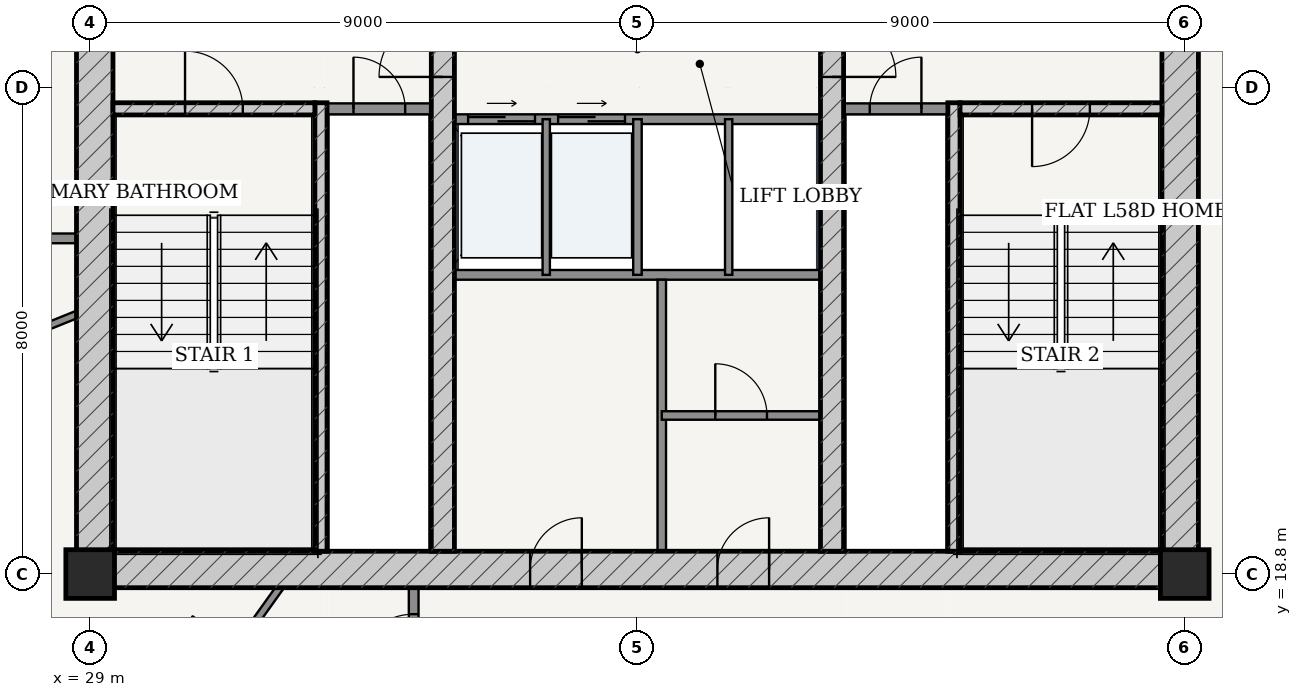
"""IFC4 building model, lengths in metres.
Left out: names, types, materials, properties, quantities, classifications, styles, units other than length and angle.
Written with IfcOpenShell. Run it as: python <this file> out.ifc"""

import sys

from ifc_helpers import new_model, si_unit, direction, frame, frame_2d, origin, origin_2d, place, context, subcontext, project, spatial, rectangle, extrude, source, transform, mapped, element, fill, save


model = new_model("IFC4")
c1 = context("Model", 3, precision=1e-05, world=origin(), true_north=direction((-0.2419218956, 0.970295726276)))
c2 = subcontext(c1, "Body", "Model", "MODEL_VIEW")
j1 = project(units=[si_unit("LENGTHUNIT", "METRE"), si_unit("PLANEANGLEUNIT", "RADIAN")], contexts=[c1])
p1 = place(None, origin())
s1 = spatial("IfcSite", under=j1, at=p1, CompositionType="ELEMENT")
p2 = place(p1, origin())
s2 = spatial("IfcBuilding", under=s1, at=p2, CompositionType="ELEMENT")
p3 = place(p2, frame((0.0, 0.0, 220.8)))
s3 = spatial("IfcBuildingStorey", under=s2, at=p3, CompositionType="ELEMENT", Elevation=220.8)
for number, where, z_axis, x_axis in (
    (1, (29.0, 18.8, 0.0), (0.0, 0.0, 1.0), (1.0, 0.0, 0.0)),
    (2, (47.0, 18.8, 0.0), (0.0, 0.0, 1.0), (1.0, 0.0, 0.0)),
):
    element("IfcColumn", number, at=place(p3, frame(where, z_axis=z_axis, x_axis=x_axis)), inside=s3, PredefinedType="COLUMN", context=c2, shape_type="SweptSolid", body=[
        extrude(rectangle(XDim=0.8, YDim=0.8, at=origin_2d()), origin(), (0.0, 0.0, 1.0), 3.7),
    ])
p4 = place(p3, frame((28.775, 18.875, 0.0), z_axis=(0.0, 0.0, 1.0), x_axis=(1.0, 0.0, 0.0)))
e3 = element("IfcWall", 3, at=p4, inside=s3, PredefinedType="SHEAR", context=c2, shape_type="SweptSolid", body=[
    extrude(rectangle(XDim=18.45, YDim=0.6, at=frame_2d((9.225, 0.0))), origin(), (0.0, 0.0, 1.0), 3.435),
])
p5 = place(p4, frame((7.46, 0.0, 0.0)))
e4 = element("IfcOpeningElement", 4, at=p5, cuts=e3, PredefinedType="OPENING", context=c2, shape_type="SweptSolid", body=[
    extrude(rectangle(XDim=0.85, YDim=2.1, at=frame_2d((0.425, 1.05))), frame((0.0, 0.31, 0.0), z_axis=(0.0, -1.0, 0.0), x_axis=(1.0, 0.0, 0.0)), (0.0, 0.0, 1.0), 0.62),
])
p6 = place(p4, frame((10.54, 0.0, 0.0)))
e5 = element("IfcOpeningElement", 5, at=p6, cuts=e3, PredefinedType="OPENING", context=c2, shape_type="SweptSolid", body=[
    extrude(rectangle(XDim=0.85, YDim=2.1, at=frame_2d((0.425, 1.05))), frame((0.0, 0.31, 0.0), z_axis=(0.0, -1.0, 0.0), x_axis=(1.0, 0.0, 0.0)), (0.0, 0.0, 1.0), 0.62),
])
p7 = place(p3, frame((29.075, 19.175, 0.0), z_axis=(0.0, 0.0, 1.0), x_axis=(0.0, 1.0, 0.0)))
e6 = element("IfcWall", 6, at=p7, inside=s3, PredefinedType="SHEAR", context=c2, shape_type="SweptSolid", body=[
    extrude(rectangle(XDim=15.25, YDim=0.6, at=frame_2d((7.625, 0.0))), origin(), (0.0, 0.0, 1.0), 3.435),
])
p8 = place(p7, frame((9.875, 0.0, 0.0)))
e7 = element("IfcOpeningElement", 7, at=p8, cuts=e6, PredefinedType="OPENING", context=c2, shape_type="SweptSolid", body=[
    extrude(rectangle(XDim=1.5, YDim=2.2, at=frame_2d((0.75, 1.1))), frame((0.0, 0.31, 0.0), z_axis=(0.0, -1.0, 0.0), x_axis=(1.0, 0.0, 0.0)), (0.0, 0.0, 1.0), 0.62),
])
p9 = place(p3, frame((46.925, 19.175, 0.0), z_axis=(0.0, 0.0, 1.0), x_axis=(0.0, 1.0, 0.0)))
e8 = element("IfcWall", 8, at=p9, inside=s3, PredefinedType="SHEAR", context=c2, shape_type="SweptSolid", body=[
    extrude(rectangle(XDim=15.25, YDim=0.6, at=frame_2d((7.625, 0.0))), origin(), (0.0, 0.0, 1.0), 3.435),
])
p10 = place(p9, frame((9.875, 0.0, 0.0)))
e9 = element("IfcOpeningElement", 9, at=p10, cuts=e8, PredefinedType="OPENING", context=c2, shape_type="SweptSolid", body=[
    extrude(rectangle(XDim=1.5, YDim=2.2, at=frame_2d((0.75, 1.1))), frame((0.0, 0.31, 0.0), z_axis=(0.0, -1.0, 0.0), x_axis=(1.0, 0.0, 0.0)), (0.0, 0.0, 1.0), 0.62),
])
p11 = place(p3, frame((32.795, 19.175, 0.0), z_axis=(0.0, 0.0, 1.0), x_axis=(0.0, 1.0, 0.0)))
e10 = element("IfcWall", 10, at=p11, inside=s3, PredefinedType="SOLIDWALL", context=c2, shape_type="SweptSolid", body=[
    extrude(rectangle(XDim=7.375, YDim=0.2, at=frame_2d((3.688, 0.0))), origin(), (0.0, 0.0, 1.0), 3.435),
])
p12 = place(p3, frame((29.375, 26.45, 0.0), z_axis=(0.0, 0.0, 1.0), x_axis=(1.0, 0.0, 0.0)))
e11 = element("IfcWall", 11, at=p12, inside=s3, PredefinedType="SOLIDWALL", context=c2, shape_type="SweptSolid", body=[
    extrude(rectangle(XDim=3.32, YDim=0.2, at=frame_2d((1.66, 0.0))), origin(), (0.0, 0.0, 1.0), 3.435),
])
p13 = place(p12, frame((1.185, 0.0, 0.0)))
e12 = element("IfcOpeningElement", 12, at=p13, cuts=e11, PredefinedType="OPENING", context=c2, shape_type="SweptSolid", body=[
    extrude(rectangle(XDim=0.95, YDim=2.15, at=frame_2d((0.475, 1.075))), frame((0.0, 0.11, 0.0), z_axis=(0.0, -1.0, 0.0), x_axis=(1.0, 0.0, 0.0)), (0.0, 0.0, 1.0), 0.22),
])
p14 = place(p3, frame((43.205, 19.175, 0.0), z_axis=(0.0, 0.0, 1.0), x_axis=(0.0, 1.0, 0.0)))
e13 = element("IfcWall", 13, at=p14, inside=s3, PredefinedType="SOLIDWALL", context=c2, shape_type="SweptSolid", body=[
    extrude(rectangle(XDim=7.375, YDim=0.2, at=frame_2d((3.688, 0.0))), origin(), (0.0, 0.0, 1.0), 3.435),
])
p15 = place(p3, frame((43.305, 26.45, 0.0), z_axis=(0.0, 0.0, 1.0), x_axis=(1.0, 0.0, 0.0)))
e14 = element("IfcWall", 14, at=p15, inside=s3, PredefinedType="SOLIDWALL", context=c2, shape_type="SweptSolid", body=[
    extrude(rectangle(XDim=3.32, YDim=0.2, at=frame_2d((1.66, 0.0))), origin(), (0.0, 0.0, 1.0), 3.435),
])
p16 = place(p15, frame((1.185, 0.0, 0.0)))
e15 = element("IfcOpeningElement", 15, at=p16, cuts=e14, PredefinedType="OPENING", context=c2, shape_type="SweptSolid", body=[
    extrude(rectangle(XDim=0.95, YDim=2.15, at=frame_2d((0.475, 1.075))), frame((0.0, 0.11, 0.0), z_axis=(0.0, -1.0, 0.0), x_axis=(1.0, 0.0, 0.0)), (0.0, 0.0, 1.0), 0.22),
])
p17 = place(p3, frame((34.8, 19.175, 0.0), z_axis=(0.0, 0.0, 1.0), x_axis=(0.0, 1.0, 0.0)))
e16 = element("IfcWall", 16, at=p17, inside=s3, PredefinedType="SHEAR", context=c2, shape_type="SweptSolid", body=[
    extrude(rectangle(XDim=15.25, YDim=0.38, at=frame_2d((7.625, 0.0))), origin(), (0.0, 0.0, 1.0), 3.435),
])
p18 = place(p17, frame((7.8, 0.0, 0.0)))
e17 = element("IfcOpeningElement", 17, at=p18, cuts=e16, PredefinedType="OPENING", context=c2, shape_type="SweptSolid", body=[
    extrude(rectangle(XDim=1.05, YDim=2.15, at=frame_2d((0.525, 1.075))), frame((0.0, 0.2, 0.0), z_axis=(0.0, -1.0, 0.0), x_axis=(1.0, 0.0, 0.0)), (0.0, 0.0, 1.0), 0.4),
])
p19 = place(p3, frame((41.2, 19.175, 0.0), z_axis=(0.0, 0.0, 1.0), x_axis=(0.0, 1.0, 0.0)))
e18 = element("IfcWall", 18, at=p19, inside=s3, PredefinedType="SHEAR", context=c2, shape_type="SweptSolid", body=[
    extrude(rectangle(XDim=15.25, YDim=0.38, at=frame_2d((7.625, 0.0))), origin(), (0.0, 0.0, 1.0), 3.435),
])
p20 = place(p19, frame((7.8, 0.0, 0.0)))
e19 = element("IfcOpeningElement", 19, at=p20, cuts=e18, PredefinedType="OPENING", context=c2, shape_type="SweptSolid", body=[
    extrude(rectangle(XDim=1.05, YDim=2.15, at=frame_2d((0.525, 1.075))), frame((0.0, 0.2, 0.0), z_axis=(0.0, -1.0, 0.0), x_axis=(1.0, 0.0, 0.0)), (0.0, 0.0, 1.0), 0.4),
])
p21 = place(p3, frame((32.9, 26.45, 0.0), z_axis=(0.0, 0.0, 1.0), x_axis=(1.0, 0.0, 0.0)))
e20 = element("IfcWall", 20, at=p21, inside=s3, PredefinedType="PARTITIONING", context=c2, shape_type="SweptSolid", body=[
    extrude(rectangle(XDim=1.71, YDim=0.18, at=frame_2d((0.855, 0.0))), origin(), (0.0, 0.0, 1.0), 3.435),
])
p22 = place(p21, frame((0.43, 0.0, 0.0)))
e21 = element("IfcOpeningElement", 21, at=p22, cuts=e20, PredefinedType="OPENING", context=c2, shape_type="SweptSolid", body=[
    extrude(rectangle(XDim=0.85, YDim=2.1, at=frame_2d((0.425, 1.05))), frame((0.0, 0.1, 0.0), z_axis=(0.0, -1.0, 0.0), x_axis=(1.0, 0.0, 0.0)), (0.0, 0.0, 1.0), 0.2),
])
p23 = place(p3, frame((41.39, 26.45, 0.0), z_axis=(0.0, 0.0, 1.0), x_axis=(1.0, 0.0, 0.0)))
e22 = element("IfcWall", 22, at=p23, inside=s3, PredefinedType="PARTITIONING", context=c2, shape_type="SweptSolid", body=[
    extrude(rectangle(XDim=1.71, YDim=0.18, at=frame_2d((0.855, 0.0))), origin(), (0.0, 0.0, 1.0), 3.435),
])
p24 = place(p23, frame((0.43, 0.0, 0.0)))
e23 = element("IfcOpeningElement", 23, at=p24, cuts=e22, PredefinedType="OPENING", context=c2, shape_type="SweptSolid", body=[
    extrude(rectangle(XDim=0.85, YDim=2.1, at=frame_2d((0.425, 1.05))), frame((0.0, 0.1, 0.0), z_axis=(0.0, -1.0, 0.0), x_axis=(1.0, 0.0, 0.0)), (0.0, 0.0, 1.0), 0.2),
])
p25 = place(p3, frame((34.99, 26.28, 0.0), z_axis=(0.0, 0.0, 1.0), x_axis=(1.0, 0.0, 0.0)))
e24 = element("IfcWall", 24, at=p25, inside=s3, PredefinedType="PARTITIONING", context=c2, shape_type="SweptSolid", body=[
    extrude(rectangle(XDim=6.02, YDim=0.16, at=frame_2d((3.01, 0.0))), origin(), (0.0, 0.0, 1.0), 3.435),
])
p26 = place(p25, frame((0.225, 0.0, 0.0)))
e25 = element("IfcOpeningElement", 25, at=p26, cuts=e24, PredefinedType="OPENING", context=c2, shape_type="SweptSolid", body=[
    extrude(rectangle(XDim=1.1, YDim=2.2, at=frame_2d((0.55, 1.1))), frame((0.0, 0.09, 0.0), z_axis=(0.0, -1.0, 0.0), x_axis=(1.0, 0.0, 0.0)), (0.0, 0.0, 1.0), 0.18),
])
p27 = place(p25, frame((1.705, 0.0, 0.0)))
e26 = element("IfcOpeningElement", 26, at=p27, cuts=e24, PredefinedType="OPENING", context=c2, shape_type="SweptSolid", body=[
    extrude(rectangle(XDim=1.1, YDim=2.2, at=frame_2d((0.55, 1.1))), frame((0.0, 0.09, 0.0), z_axis=(0.0, -1.0, 0.0), x_axis=(1.0, 0.0, 0.0)), (0.0, 0.0, 1.0), 0.18),
])
p28 = place(p3, frame((34.99, 23.72, 0.0), z_axis=(0.0, 0.0, 1.0), x_axis=(1.0, 0.0, 0.0)))
e27 = element("IfcWall", 27, at=p28, inside=s3, PredefinedType="PARTITIONING", context=c2, shape_type="SweptSolid", body=[
    extrude(rectangle(XDim=6.02, YDim=0.16, at=frame_2d((3.01, 0.0))), origin(), (0.0, 0.0, 1.0), 3.435),
])
p29 = place(p3, frame((36.5, 23.72, 0.0), z_axis=(0.0, 0.0, 1.0), x_axis=(0.0, 1.0, 0.0)))
e28 = element("IfcWall", 28, at=p29, inside=s3, PredefinedType="PARTITIONING", context=c2, shape_type="SweptSolid", body=[
    extrude(rectangle(XDim=2.56, YDim=0.12, at=frame_2d((1.28, 0.0))), origin(), (0.0, 0.0, 1.0), 3.435),
])
p30 = place(p3, frame((38.0, 23.72, 0.0), z_axis=(0.0, 0.0, 1.0), x_axis=(0.0, 1.0, 0.0)))
e29 = element("IfcWall", 29, at=p30, inside=s3, PredefinedType="PARTITIONING", context=c2, shape_type="SweptSolid", body=[
    extrude(rectangle(XDim=2.56, YDim=0.14, at=frame_2d((1.28, 0.0))), origin(), (0.0, 0.0, 1.0), 3.435),
])
p31 = place(p3, frame((39.5, 23.72, 0.0), z_axis=(0.0, 0.0, 1.0), x_axis=(0.0, 1.0, 0.0)))
e30 = element("IfcWall", 30, at=p31, inside=s3, PredefinedType="PARTITIONING", context=c2, shape_type="SweptSolid", body=[
    extrude(rectangle(XDim=2.56, YDim=0.12, at=frame_2d((1.28, 0.0))), origin(), (0.0, 0.0, 1.0), 3.435),
])
p32 = place(p3, frame((38.4, 19.175, 0.0), z_axis=(0.0, 0.0, 1.0), x_axis=(0.0, 1.0, 0.0)))
e31 = element("IfcWall", 31, at=p32, inside=s3, PredefinedType="PARTITIONING", context=c2, shape_type="SweptSolid", body=[
    extrude(rectangle(XDim=4.465, YDim=0.14, at=frame_2d((2.232, 0.0))), origin(), (0.0, 0.0, 1.0), 3.435),
])
p33 = place(p3, frame((38.4, 21.407, 0.0), z_axis=(0.0, 0.0, 1.0), x_axis=(1.0, 0.0, 0.0)))
e32 = element("IfcWall", 32, at=p33, inside=s3, PredefinedType="PARTITIONING", context=c2, shape_type="SweptSolid", body=[
    extrude(rectangle(XDim=2.61, YDim=0.14, at=frame_2d((1.305, 0.0))), origin(), (0.0, 0.0, 1.0), 3.435),
])
p34 = place(p33, frame((0.88, 0.0, 0.0)))
e33 = element("IfcOpeningElement", 33, at=p34, cuts=e32, PredefinedType="OPENING", context=c2, shape_type="SweptSolid", body=[
    extrude(rectangle(XDim=0.85, YDim=2.1, at=frame_2d((0.425, 1.05))), frame((0.0, 0.08, 0.0), z_axis=(0.0, -1.0, 0.0), x_axis=(1.0, 0.0, 0.0)), (0.0, 0.0, 1.0), 0.16),
])
p35 = place(p3, frame((26.845, 24.32, 0.0), z_axis=(0.0, 0.0, 1.0), x_axis=(1.0, 0.0, 0.0)))
e34 = element("IfcWall", 34, at=p35, inside=s3, PredefinedType="PARTITIONING", context=c2, shape_type="SweptSolid", body=[
    extrude(rectangle(XDim=1.93, YDim=0.16, at=frame_2d((0.965, 0.0))), origin(), (0.0, 0.0, 1.0), 3.435),
])
p36 = place(p3, frame((34.32, 16.725, 0.0), z_axis=(0.0, 0.0, 1.0), x_axis=(0.0, 1.0, 0.0)))
e35 = element("IfcWall", 35, at=p36, inside=s3, PredefinedType="PARTITIONING", context=c2, shape_type="SweptSolid", body=[
    extrude(rectangle(XDim=1.85, YDim=0.16, at=frame_2d((0.925, 0.0))), origin(), (0.0, 0.0, 1.0), 3.435),
])
p37 = place(p36, frame((0.435, 0.0, 0.0)))
e36 = element("IfcOpeningElement", 36, at=p37, cuts=e35, PredefinedType="OPENING", context=c2, shape_type="SweptSolid", body=[
    extrude(rectangle(XDim=0.98, YDim=2.2, at=frame_2d((0.49, 1.1))), frame((0.0, 0.09, 0.0), z_axis=(0.0, -1.0, 0.0), x_axis=(1.0, 0.0, 0.0)), (0.0, 0.0, 1.0), 0.18),
])
p38 = place(p3, frame((28.775, 23.067, 0.0), z_axis=(0.0, 0.0, 1.0), x_axis=(-0.926976443277, -0.375119545757, 0.0)))
e37 = element("IfcWall", 37, at=p38, inside=s3, PredefinedType="PARTITIONING", context=c2, shape_type="SweptSolid", body=[
    extrude(rectangle(XDim=4.23, YDim=0.12, at=frame_2d((2.115, 0.0))), origin(), (0.0, 0.0, 1.0), 3.435),
])
p39 = place(p38, frame((1.685, 0.0, 0.0)))
e38 = element("IfcOpeningElement", 38, at=p39, cuts=e37, PredefinedType="OPENING", context=c2, shape_type="SweptSolid", body=[
    extrude(rectangle(XDim=0.86, YDim=2.15, at=frame_2d((0.43, 1.075))), frame((0.0, 0.07, 0.0), z_axis=(0.0, -1.0, 0.0), x_axis=(1.0, 0.0, 0.0)), (0.0, 0.0, 1.0), 0.14),
])
p40 = place(p3, frame((32.117, 18.575, 0.0), z_axis=(0.0, 0.0, 1.0), x_axis=(-0.581813438478, -0.813322274874, 0.0)))
e39 = element("IfcWall", 39, at=p40, inside=s3, PredefinedType="PARTITIONING", context=c2, shape_type="SweptSolid", body=[
    extrude(rectangle(XDim=3.331, YDim=0.12, at=frame_2d((1.666, 0.0))), origin(), (0.0, 0.0, 1.0), 3.435),
])
p41 = place(p40, frame((1.216, 0.0, 0.0)))
e40 = element("IfcOpeningElement", 40, at=p41, cuts=e39, PredefinedType="OPENING", context=c2, shape_type="SweptSolid", body=[
    extrude(rectangle(XDim=0.9, YDim=2.15, at=frame_2d((0.45, 1.075))), frame((0.0, 0.07, 0.0), z_axis=(0.0, -1.0, 0.0), x_axis=(1.0, 0.0, 0.0)), (0.0, 0.0, 1.0), 0.14),
])
m1 = source(origin(), c2, "Body", "SweptSolid", [
    extrude(rectangle(XDim=1.05, YDim=2.15, at=frame_2d((0.525, 1.075))), frame((0.0, 0.025, 0.0), z_axis=(0.0, -1.0, 0.0), x_axis=(1.0, 0.0, 0.0)), (0.0, 0.0, 1.0), 0.05),
])
p42 = place(p18, origin())
e41 = element("IfcDoor", 41, at=p42, inside=s3, OperationType="SINGLE_SWING_LEFT", PredefinedType="DOOR", context=c2, shape_type="MappedRepresentation", body=[
    mapped(m1, transform((0.0, 0.0, 0.0), scale=1.0)),
])
fill(e17, e41)
p43 = place(p20, frame((1.05, 0.0, 0.0), z_axis=(0.0, 0.0, 1.0), x_axis=(-1.0, 0.0, 0.0)))
e42 = element("IfcDoor", 42, at=p43, inside=s3, OperationType="SINGLE_SWING_RIGHT", PredefinedType="DOOR", context=c2, shape_type="MappedRepresentation", body=[
    mapped(m1, transform((0.0, 0.0, 0.0), scale=1.0)),
])
fill(e19, e42)
m2 = source(origin(), c2, "Body", "SweptSolid", [
    extrude(rectangle(XDim=0.95, YDim=2.15, at=frame_2d((0.475, 1.075))), frame((0.0, 0.025, 0.0), z_axis=(0.0, -1.0, 0.0), x_axis=(1.0, 0.0, 0.0)), (0.0, 0.0, 1.0), 0.05),
])
p44 = place(p13, origin())
e43 = element("IfcDoor", 43, at=p44, inside=s3, OperationType="SINGLE_SWING_LEFT", PredefinedType="DOOR", context=c2, shape_type="MappedRepresentation", body=[
    mapped(m2, transform((0.0, 0.0, 0.0), scale=1.0)),
])
fill(e12, e43)
p45 = place(p16, frame((0.95, 0.0, 0.0), z_axis=(0.0, 0.0, 1.0), x_axis=(-1.0, 0.0, 0.0)))
e44 = element("IfcDoor", 44, at=p45, inside=s3, OperationType="SINGLE_SWING_RIGHT", PredefinedType="DOOR", context=c2, shape_type="MappedRepresentation", body=[
    mapped(m2, transform((0.0, 0.0, 0.0), scale=1.0)),
])
fill(e15, e44)
m3 = source(origin(), c2, "Body", "SweptSolid", [
    extrude(rectangle(XDim=0.85, YDim=2.1, at=frame_2d((0.425, 1.05))), frame((0.0, 0.025, 0.0), z_axis=(0.0, -1.0, 0.0), x_axis=(1.0, 0.0, 0.0)), (0.0, 0.0, 1.0), 0.05),
])
p46 = place(p22, origin())
e45 = element("IfcDoor", 45, at=p46, inside=s3, OperationType="SINGLE_SWING_LEFT", PredefinedType="DOOR", context=c2, shape_type="MappedRepresentation", body=[
    mapped(m3, transform((0.0, 0.0, 0.0), scale=1.0)),
])
fill(e21, e45)
p47 = place(p24, origin())
e46 = element("IfcDoor", 46, at=p47, inside=s3, OperationType="SINGLE_SWING_RIGHT", PredefinedType="DOOR", context=c2, shape_type="MappedRepresentation", body=[
    mapped(m3, transform((0.0, 0.0, 0.0), scale=1.0)),
])
fill(e23, e46)
p48 = place(p5, origin())
e47 = element("IfcDoor", 47, at=p48, inside=s3, OperationType="SINGLE_SWING_RIGHT", PredefinedType="DOOR", context=c2, shape_type="MappedRepresentation", body=[
    mapped(m3, transform((0.0, 0.0, 0.0), scale=1.0)),
])
fill(e4, e47)
p49 = place(p6, origin())
e48 = element("IfcDoor", 48, at=p49, inside=s3, OperationType="SINGLE_SWING_RIGHT", PredefinedType="DOOR", context=c2, shape_type="MappedRepresentation", body=[
    mapped(m3, transform((0.0, 0.0, 0.0), scale=1.0)),
])
fill(e5, e48)
p50 = place(p34, origin())
e49 = element("IfcDoor", 49, at=p50, inside=s3, OperationType="SINGLE_SWING_LEFT", PredefinedType="DOOR", context=c2, shape_type="MappedRepresentation", body=[
    mapped(m3, transform((0.0, 0.0, 0.0), scale=1.0)),
])
fill(e33, e49)
m4 = source(origin(), c2, "Body", "SweptSolid", [
    extrude(rectangle(XDim=1.1, YDim=2.2, at=frame_2d((0.55, 1.1))), frame((0.0, 0.025, 0.0), z_axis=(0.0, -1.0, 0.0), x_axis=(1.0, 0.0, 0.0)), (0.0, 0.0, 1.0), 0.05),
])
p51 = place(p26, origin())
e50 = element("IfcDoor", 50, at=p51, inside=s3, OperationType="DOUBLE_DOOR_SLIDING", PredefinedType="DOOR", context=c2, shape_type="MappedRepresentation", body=[
    mapped(m4, transform((0.0, 0.0, 0.0), scale=1.0)),
])
fill(e25, e50)
p52 = place(p27, origin())
e51 = element("IfcDoor", 51, at=p52, inside=s3, OperationType="DOUBLE_DOOR_SLIDING", PredefinedType="DOOR", context=c2, shape_type="MappedRepresentation", body=[
    mapped(m4, transform((0.0, 0.0, 0.0), scale=1.0)),
])
fill(e26, e51)
m5 = source(origin(), c2, "Body", "SweptSolid", [
    extrude(rectangle(XDim=0.98, YDim=2.2, at=frame_2d((0.49, 1.1))), frame((0.0, 0.025, 0.0), z_axis=(0.0, -1.0, 0.0), x_axis=(1.0, 0.0, 0.0)), (0.0, 0.0, 1.0), 0.05),
])
p53 = place(p37, origin())
e52 = element("IfcDoor", 52, at=p53, inside=s3, OperationType="SINGLE_SWING_LEFT", PredefinedType="DOOR", context=c2, shape_type="MappedRepresentation", body=[
    mapped(m5, transform((0.0, 0.0, 0.0), scale=1.0)),
])
fill(e36, e52)
save(model, sys.argv[1])
